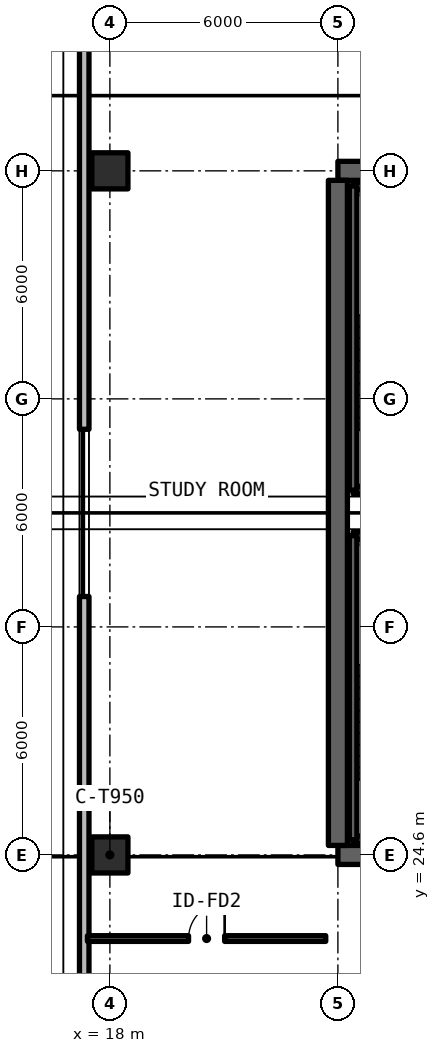
"""IFC4 building model, lengths in metres.
Left out: names, types, materials, properties, quantities, classifications, styles, units other than length and angle.
Written with IfcOpenShell. Run it as: python <this file> out.ifc"""

import sys

from ifc_helpers import new_model, si_unit, direction, frame, frame_2d, origin, origin_2d, place, context, subcontext, project, spatial, rectangle, extrude, element, fill, save


model = new_model("IFC4")
c1 = context("Model", 3, precision=1e-05, world=origin(), true_north=direction((0.0, 1.0)))
c2 = subcontext(c1, "Body", "Model", "MODEL_VIEW")
j1 = project(units=[si_unit("LENGTHUNIT", "METRE"), si_unit("PLANEANGLEUNIT", "RADIAN")], contexts=[c1])
p1 = place(None, origin())
s1 = spatial("IfcSite", under=j1, at=p1, CompositionType="ELEMENT")
p2 = place(p1, origin())
s2 = spatial("IfcBuilding", under=s1, at=p2, CompositionType="ELEMENT")
p3 = place(p2, frame((0.0, 0.0, 119.46)))
s3 = spatial("IfcBuildingStorey", under=s2, at=p3, CompositionType="ELEMENT", Elevation=119.46)
for number, where, z_axis, x_axis in (
    (1, (24.0, 24.6, 0.0), (0.0, 0.0, 1.0), (1.0, 0.0, 0.0)),
    (2, (36.0, 42.6, 0.0), (0.0, 0.0, 1.0), (-1.0, 0.0, 0.0)),
):
    element("IfcWall", number, at=place(p3, frame(where, z_axis=z_axis, x_axis=x_axis)), inside=s3, PredefinedType="SHEAR", context=c2, shape_type="SweptSolid", body=[
        extrude(rectangle(XDim=12.0, YDim=0.5, at=frame_2d((6.0, 0.0))), origin(), (0.0, 0.0, 1.0), 3.63),
    ])
p4 = place(p3, frame((24.0, 24.85, 0.0), z_axis=(0.0, 0.0, 1.0), x_axis=(0.0, 1.0, 0.0)))
e3 = element("IfcWall", 3, at=p4, inside=s3, PredefinedType="SHEAR", context=c2, shape_type="SweptSolid", body=[
    extrude(rectangle(XDim=17.5, YDim=0.5, at=frame_2d((8.75, 0.0))), origin(), (0.0, 0.0, 1.0), 3.63),
])
for number, where, z_axis, x_axis in (
    (4, (18.0, 24.6, 0.0), (0.0, 0.0, 1.0), (1.0, 0.0, 0.0)),
    (5, (18.0, 42.6, 0.0), (0.0, 0.0, 1.0), (1.0, 0.0, 0.0)),
):
    element("IfcColumn", number, at=place(p3, frame(where, z_axis=z_axis, x_axis=x_axis)), inside=s3, PredefinedType="COLUMN", context=c2, shape_type="SweptSolid", body=[
        extrude(rectangle(XDim=0.95, YDim=0.95, at=origin_2d()), origin(), (0.0, 0.0, 1.0), 3.63),
    ])
p5 = place(p3, frame((17.325, 53.348, 0.0), z_axis=(0.0, 0.0, 1.0), x_axis=(0.0, -1.0, 0.0)))
e6 = element("IfcWall", 6, at=p5, inside=s3, PredefinedType="SOLIDWALL", context=c2, shape_type="SweptSolid", body=[
    extrude(rectangle(XDim=39.496, YDim=0.25, at=frame_2d((19.748, 0.0))), origin(), (0.0, 0.0, 1.0), 3.35),
])
p6 = place(p5, frame((17.548, 0.0, 0.78)))
e7 = element("IfcOpeningElement", 7, at=p6, cuts=e6, PredefinedType="OPENING", context=c2, shape_type="SweptSolid", body=[
    extrude(rectangle(XDim=4.4, YDim=1.66, at=frame_2d((2.2, 0.83))), frame((0.0, 0.135, 0.0), z_axis=(0.0, -1.0, 0.0), x_axis=(1.0, 0.0, 0.0)), (0.0, 0.0, 1.0), 0.27),
])
p7 = place(p5, frame((35.642, 0.0, 0.78)))
e8 = element("IfcOpeningElement", 8, at=p7, cuts=e6, PredefinedType="OPENING", context=c2, shape_type="SweptSolid", body=[
    extrude(rectangle(XDim=1.4, YDim=1.65, at=frame_2d((0.7, 0.825))), frame((0.0, 0.135, 0.0), z_axis=(0.0, -1.0, 0.0), x_axis=(1.0, 0.0, 0.0)), (0.0, 0.0, 1.0), 0.27),
])
p8 = place(p3, frame((17.41, 22.4, 0.0), z_axis=(0.0, 0.0, 1.0), x_axis=(1.0, 0.0, 0.0)))
e9 = element("IfcWall", 9, at=p8, inside=s3, PredefinedType="SOLIDWALL", context=c2, shape_type="SweptSolid", body=[
    extrude(rectangle(XDim=6.27, YDim=0.15, at=frame_2d((3.135, 0.0))), origin(), (0.0, 0.0, 1.0), 2.57),
])
p9 = place(p8, frame((2.66, 0.0, 0.0)))
e10 = element("IfcOpeningElement", 10, at=p9, cuts=e9, PredefinedType="OPENING", context=c2, shape_type="SweptSolid", body=[
    extrude(rectangle(XDim=0.95, YDim=2.15, at=frame_2d((0.475, 1.075))), frame((0.0, 0.085, 0.0), z_axis=(0.0, -1.0, 0.0), x_axis=(1.0, 0.0, 0.0)), (0.0, 0.0, 1.0), 0.17),
])
for number, where, z_axis, x_axis in (
    (11, (24.4, 25.0, 0.0), (0.0, 0.0, 1.0), (1.0, 0.0, 0.0)),
    (12, (27.8, 33.0, 0.0), (0.0, 0.0, 1.0), (-1.0, 0.0, 0.0)),
):
    element("IfcWall", number, at=place(p3, frame(where, z_axis=z_axis, x_axis=x_axis)), inside=s3, PredefinedType="SOLIDWALL", context=c2, shape_type="SweptSolid", body=[
        extrude(rectangle(XDim=3.4, YDim=0.2, at=frame_2d((1.7, 0.0))), origin(), (0.0, 0.0, 1.0), 3.63),
    ])
p10 = place(p3, frame((24.4, 33.0, 0.0), z_axis=(0.0, 0.0, 1.0), x_axis=(0.0, -1.0, 0.0)))
e13 = element("IfcWall", 13, at=p10, inside=s3, PredefinedType="SOLIDWALL", context=c2, shape_type="SweptSolid", body=[
    extrude(rectangle(XDim=8.0, YDim=0.2, at=frame_2d((4.0, 0.0))), origin(), (0.0, 0.0, 1.0), 3.63),
])
for number, where, z_axis, x_axis in (
    (14, (24.4, 34.2, 0.0), (0.0, 0.0, 1.0), (1.0, 0.0, 0.0)),
    (15, (27.8, 42.2, 0.0), (0.0, 0.0, 1.0), (-1.0, 0.0, 0.0)),
):
    element("IfcWall", number, at=place(p3, frame(where, z_axis=z_axis, x_axis=x_axis)), inside=s3, PredefinedType="SOLIDWALL", context=c2, shape_type="SweptSolid", body=[
        extrude(rectangle(XDim=3.4, YDim=0.2, at=frame_2d((1.7, 0.0))), origin(), (0.0, 0.0, 1.0), 3.63),
    ])
p11 = place(p3, frame((24.4, 42.2, 0.0), z_axis=(0.0, 0.0, 1.0), x_axis=(0.0, -1.0, 0.0)))
e16 = element("IfcWall", 16, at=p11, inside=s3, PredefinedType="SOLIDWALL", context=c2, shape_type="SweptSolid", body=[
    extrude(rectangle(XDim=8.0, YDim=0.2, at=frame_2d((4.0, 0.0))), origin(), (0.0, 0.0, 1.0), 3.63),
])
p12 = place(p6, origin())
e17 = element("IfcWindow", 17, at=p12, inside=s3, PartitioningType="SINGLE_PANEL", PredefinedType="WINDOW", context=c2, shape_type="SweptSolid", body=[
    extrude(rectangle(XDim=4.4, YDim=1.66, at=frame_2d((2.2, 0.83))), frame((0.0, 0.03, 0.0), z_axis=(0.0, -1.0, 0.0), x_axis=(1.0, 0.0, 0.0)), (0.0, 0.0, 1.0), 0.06),
])
fill(e7, e17)
p13 = place(p9, origin())
e18 = element("IfcDoor", 18, at=p13, inside=s3, OperationType="SINGLE_SWING_RIGHT", PredefinedType="DOOR", context=c2, shape_type="SweptSolid", body=[
    extrude(rectangle(XDim=0.95, YDim=2.15, at=frame_2d((0.475, 1.075))), frame((0.0, 0.025, 0.0), z_axis=(0.0, -1.0, 0.0), x_axis=(1.0, 0.0, 0.0)), (0.0, 0.0, 1.0), 0.05),
])
fill(e10, e18)
save(model, sys.argv[1])
